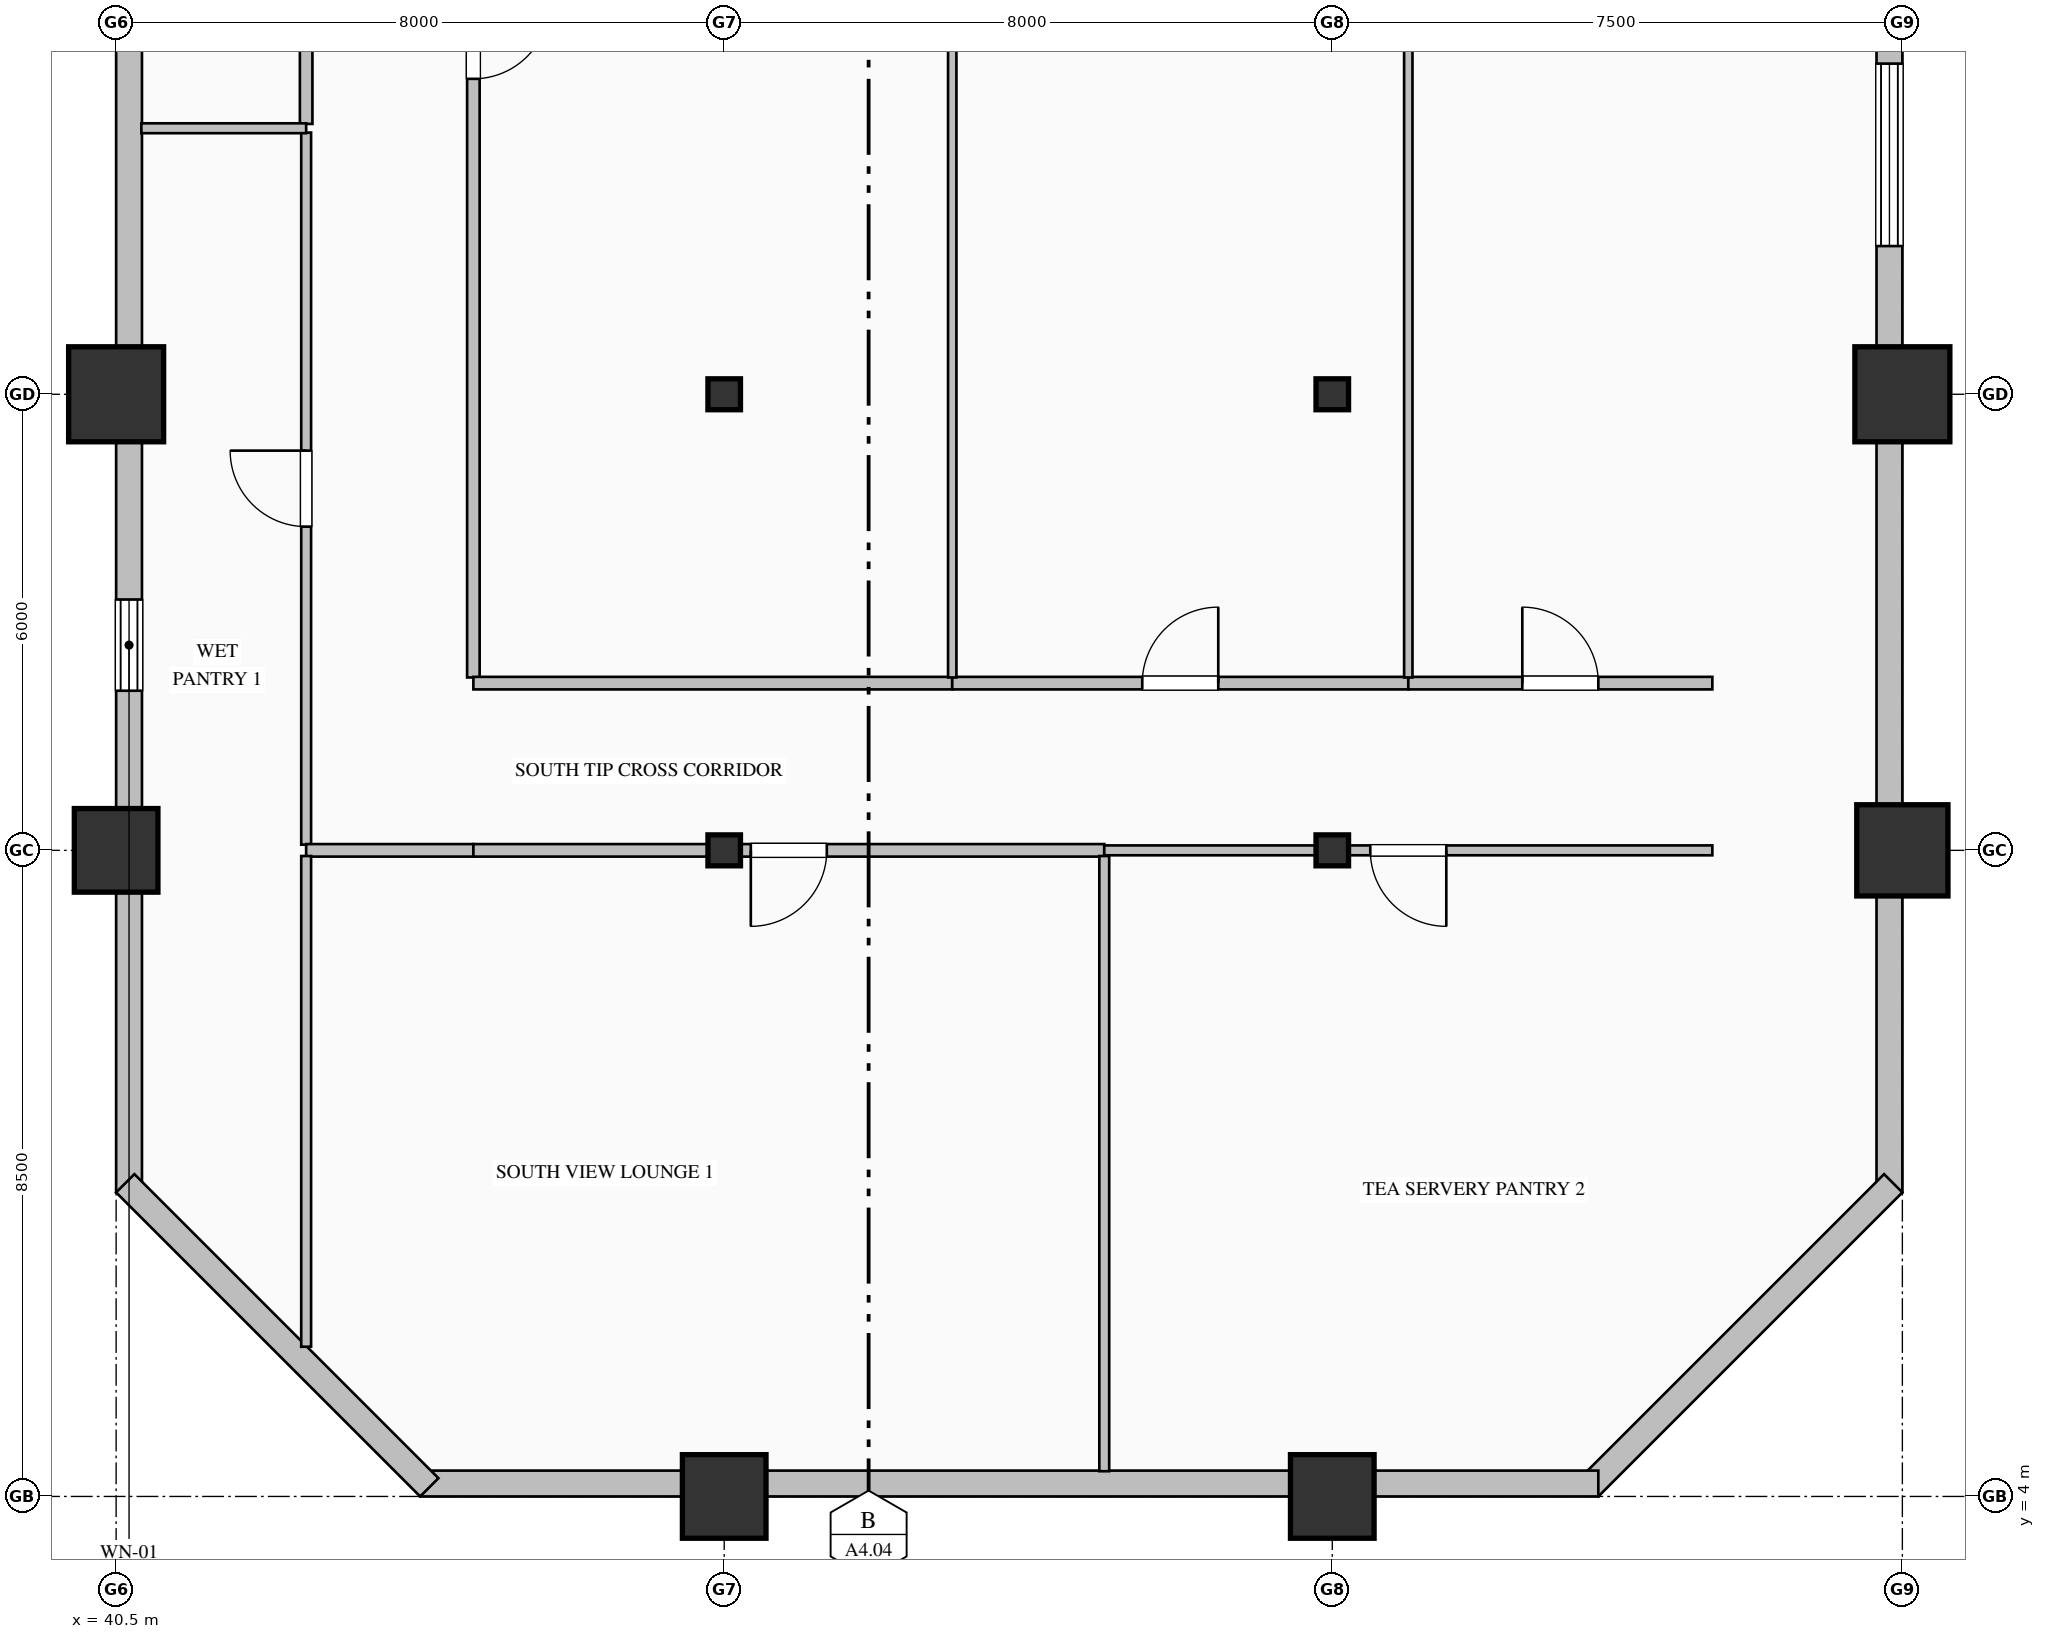
"""IFC4 building model, lengths in metres.
Left out: names, types, materials, properties, quantities, classifications, styles, units other than length and angle.
Written with IfcOpenShell. Run it as: python <this file> out.ifc"""

import sys

from ifc_helpers import new_model, si_unit, direction, frame, frame_2d, origin, origin_2d, place, context, subcontext, project, spatial, rectangle, hollow_rectangle, hollow_circle, i_section, extrude, element, fill, save


model = new_model("IFC4")
c1 = context("Model", 3, precision=1e-05, world=origin(), true_north=direction((0.0, 1.0)))
c2 = subcontext(c1, "Body", "Model", "MODEL_VIEW")
j1 = project(units=[si_unit("LENGTHUNIT", "METRE"), si_unit("PLANEANGLEUNIT", "RADIAN")], contexts=[c1])
p1 = place(None, origin())
s1 = spatial("IfcSite", under=j1, at=p1, CompositionType="ELEMENT")
p2 = place(p1, origin())
s2 = spatial("IfcBuilding", under=s1, at=p2, CompositionType="ELEMENT")
p3 = place(p2, frame((0.0, 0.0, 72.2)))
s3 = spatial("IfcBuildingStorey", under=s2, at=p3, CompositionType="ELEMENT", Elevation=72.2)
p4 = place(p3, frame((40.5, 12.5, 0.0), z_axis=(0.0, 0.0, 1.0), x_axis=(1.0, 0.0, 0.0)))
e1 = element("IfcColumn", 1, at=p4, inside=s3, PredefinedType="COLUMN", context=c2, shape_type="SweptSolid", body=[
    extrude(hollow_rectangle(XDim=1.1, YDim=1.1, WallThickness=0.04, at=origin_2d()), origin(), (0.0, 0.0, 1.0), 4.0),
])
p5 = place(p3, frame((40.5, 18.5, 0.0), z_axis=(0.0, 0.0, 1.0), x_axis=(1.0, 0.0, 0.0)))
e2 = element("IfcColumn", 2, at=p5, inside=s3, PredefinedType="COLUMN", context=c2, shape_type="SweptSolid", body=[
    extrude(hollow_rectangle(XDim=1.25, YDim=1.25, WallThickness=0.045, at=origin_2d()), origin(), (0.0, 0.0, 1.0), 4.0),
])
p6 = place(p3, frame((48.5, 4.0, 0.0), z_axis=(0.0, 0.0, 1.0), x_axis=(1.0, 0.0, 0.0)))
e3 = element("IfcColumn", 3, at=p6, inside=s3, PredefinedType="COLUMN", context=c2, shape_type="SweptSolid", body=[
    extrude(hollow_rectangle(XDim=1.1, YDim=1.1, WallThickness=0.04, at=origin_2d()), origin(), (0.0, 0.0, 1.0), 4.0),
])
for number, where, z_axis, x_axis in (
    (4, (48.5, 12.5, 0.0), (0.0, 0.0, 1.0), (1.0, 0.0, 0.0)),
    (5, (48.5, 18.5, 0.0), (0.0, 0.0, 1.0), (1.0, 0.0, 0.0)),
):
    element("IfcColumn", number, at=place(p3, frame(where, z_axis=z_axis, x_axis=x_axis)), inside=s3, PredefinedType="COLUMN", context=c2, shape_type="SweptSolid", body=[
        extrude(i_section(OverallWidth=0.407, OverallDepth=0.428, WebThickness=0.02, FlangeThickness=0.035, FilletRadius=0.022, at=origin_2d()), origin(), (0.0, 0.0, 1.0), 4.0),
    ])
p7 = place(p3, frame((56.5, 4.0, 0.0), z_axis=(0.0, 0.0, 1.0), x_axis=(1.0, 0.0, 0.0)))
e6 = element("IfcColumn", 6, at=p7, inside=s3, PredefinedType="COLUMN", context=c2, shape_type="SweptSolid", body=[
    extrude(hollow_rectangle(XDim=1.1, YDim=1.1, WallThickness=0.04, at=origin_2d()), origin(), (0.0, 0.0, 1.0), 4.0),
])
for number, where, z_axis, x_axis in (
    (7, (56.5, 12.5, 0.0), (0.0, 0.0, 1.0), (1.0, 0.0, 0.0)),
    (8, (56.5, 18.5, 0.0), (0.0, 0.0, 1.0), (1.0, 0.0, 0.0)),
):
    element("IfcColumn", number, at=place(p3, frame(where, z_axis=z_axis, x_axis=x_axis)), inside=s3, PredefinedType="COLUMN", context=c2, shape_type="SweptSolid", body=[
        extrude(i_section(OverallWidth=0.407, OverallDepth=0.428, WebThickness=0.02, FlangeThickness=0.035, FilletRadius=0.022, at=origin_2d()), origin(), (0.0, 0.0, 1.0), 4.0),
    ])
p8 = place(p3, frame((64.0, 12.5, 0.0), z_axis=(0.0, 0.0, 1.0), x_axis=(1.0, 0.0, 0.0)))
e9 = element("IfcColumn", 9, at=p8, inside=s3, PredefinedType="COLUMN", context=c2, shape_type="SweptSolid", body=[
    extrude(hollow_circle(Radius=0.6, WallThickness=0.04, at=origin_2d()), origin(), (0.0, 0.0, 1.0), 4.0),
])
p9 = place(p3, frame((64.0, 18.5, 0.0), z_axis=(0.0, 0.0, 1.0), x_axis=(1.0, 0.0, 0.0)))
e10 = element("IfcColumn", 10, at=p9, inside=s3, PredefinedType="COLUMN", context=c2, shape_type="SweptSolid", body=[
    extrude(hollow_rectangle(XDim=1.25, YDim=1.25, WallThickness=0.045, at=origin_2d()), origin(), (0.0, 0.0, 1.0), 4.0),
])
p10 = place(p3, frame((40.67, 8.0, 0.0), z_axis=(0.0, 0.0, 1.0), x_axis=(0.0, 1.0, 0.0)))
e11 = element("IfcWall", 11, at=p10, inside=s3, PredefinedType="SOLIDWALL", context=c2, shape_type="SweptSolid", body=[
    extrude(rectangle(XDim=20.34, YDim=0.34, at=frame_2d((10.17, 0.0))), origin(), (0.0, 0.0, 1.0), 3.05),
])
p11 = place(p10, frame((6.6, 0.0, 0.7)))
e12 = element("IfcOpeningElement", 12, at=p11, cuts=e11, PredefinedType="OPENING", context=c2, shape_type="SweptSolid", body=[
    extrude(rectangle(XDim=1.2, YDim=1.85, at=frame_2d((0.6, 0.925))), frame((0.0, 0.18, 0.0), z_axis=(0.0, -1.0, 0.0), x_axis=(1.0, 0.0, 0.0)), (0.0, 0.0, 1.0), 0.36),
])
p12 = place(p3, frame((63.83, 36.05, 0.0), z_axis=(0.0, 0.0, 1.0), x_axis=(0.0, -1.0, 0.0)))
e13 = element("IfcWall", 13, at=p12, inside=s3, PredefinedType="SOLIDWALL", context=c2, shape_type="SweptSolid", body=[
    extrude(rectangle(XDim=28.05, YDim=0.34, at=frame_2d((14.025, 0.0))), origin(), (0.0, 0.0, 1.0), 3.25),
])
p13 = place(p12, frame((2.4, 0.0, 0.8)))
e14 = element("IfcOpeningElement", 14, at=p13, cuts=e13, PredefinedType="OPENING", context=c2, shape_type="SweptSolid", body=[
    extrude(rectangle(XDim=2.4, YDim=2.15, at=frame_2d((1.2, 1.075))), frame((0.0, 0.18, 0.0), z_axis=(0.0, -1.0, 0.0), x_axis=(1.0, 0.0, 0.0)), (0.0, 0.0, 1.0), 0.36),
])
p14 = place(p12, frame((9.75, 0.0, 0.85)))
e15 = element("IfcOpeningElement", 15, at=p14, cuts=e13, PredefinedType="OPENING", context=c2, shape_type="SweptSolid", body=[
    extrude(rectangle(XDim=2.1, YDim=2.05, at=frame_2d((1.05, 1.025))), frame((0.0, 0.18, 0.0), z_axis=(0.0, -1.0, 0.0), x_axis=(1.0, 0.0, 0.0)), (0.0, 0.0, 1.0), 0.36),
])
p15 = place(p12, frame((13.2, 0.0, 0.8)))
e16 = element("IfcOpeningElement", 16, at=p15, cuts=e13, PredefinedType="OPENING", context=c2, shape_type="SweptSolid", body=[
    extrude(rectangle(XDim=2.4, YDim=2.15, at=frame_2d((1.2, 1.075))), frame((0.0, 0.18, 0.0), z_axis=(0.0, -1.0, 0.0), x_axis=(1.0, 0.0, 0.0)), (0.0, 0.0, 1.0), 0.36),
])
p16 = place(p3, frame((63.88, 8.12, 0.0), z_axis=(0.0, 0.0, 1.0), x_axis=(-0.707106781187, -0.707106781187, 0.0)))
e17 = element("IfcWall", 17, at=p16, inside=s3, PredefinedType="SOLIDWALL", context=c2, shape_type="SweptSolid", body=[
    extrude(rectangle(XDim=5.657, YDim=0.34, at=frame_2d((2.828, 0.0))), origin(), (0.0, 0.0, 1.0), 3.75),
])
p17 = place(p3, frame((60.0, 4.17, 0.0), z_axis=(0.0, 0.0, 1.0), x_axis=(-1.0, 0.0, 0.0)))
e18 = element("IfcWall", 18, at=p17, inside=s3, PredefinedType="SOLIDWALL", context=c2, shape_type="SweptSolid", body=[
    extrude(rectangle(XDim=15.5, YDim=0.34, at=frame_2d((7.75, 0.0))), origin(), (0.0, 0.0, 1.0), 3.25),
])
p18 = place(p3, frame((44.62, 4.12, 0.0), z_axis=(0.0, 0.0, 1.0), x_axis=(-0.707106781187, 0.707106781187, 0.0)))
e19 = element("IfcWall", 19, at=p18, inside=s3, PredefinedType="SOLIDWALL", context=c2, shape_type="SweptSolid", body=[
    extrude(rectangle(XDim=5.657, YDim=0.34, at=frame_2d((2.828, 0.0))), origin(), (0.0, 0.0, 1.0), 3.75),
])
p19 = place(p3, frame((45.2, 31.525, 0.0), z_axis=(0.0, 0.0, 1.0), x_axis=(0.0, -1.0, 0.0)))
e20 = element("IfcWall", 20, at=p19, inside=s3, PredefinedType="PARTITIONING", context=c2, shape_type="SweptSolid", body=[
    extrude(rectangle(XDim=16.751, YDim=0.165, at=frame_2d((8.375, 0.0))), origin(), (0.0, 0.0, 1.0), 3.75),
])
p20 = place(p19, frame((7.875, 0.0, 0.0)))
e21 = element("IfcOpeningElement", 21, at=p20, cuts=e20, PredefinedType="OPENING", context=c2, shape_type="SweptSolid", body=[
    extrude(rectangle(XDim=1.0, YDim=2.15, at=frame_2d((0.5, 1.075))), frame((0.0, 0.093, 0.0), z_axis=(0.0, -1.0, 0.0), x_axis=(1.0, 0.0, 0.0)), (0.0, 0.0, 1.0), 0.185),
])
p21 = place(p3, frame((43.0, 12.574, 0.0), z_axis=(0.0, 0.0, 1.0), x_axis=(0.0, 1.0, 0.0)))
e22 = element("IfcWall", 22, at=p21, inside=s3, PredefinedType="PARTITIONING", context=c2, shape_type="SweptSolid", body=[
    extrude(rectangle(XDim=9.369, YDim=0.13, at=frame_2d((4.684, 0.0))), origin(), (0.0, 0.0, 1.0), 3.75),
])
p22 = place(p21, frame((4.184, 0.0, 0.0)))
e23 = element("IfcOpeningElement", 23, at=p22, cuts=e22, PredefinedType="OPENING", context=c2, shape_type="SweptSolid", body=[
    extrude(rectangle(XDim=1.0, YDim=2.15, at=frame_2d((0.5, 1.075))), frame((0.0, 0.075, 0.0), z_axis=(0.0, -1.0, 0.0), x_axis=(1.0, 0.0, 0.0)), (0.0, 0.0, 1.0), 0.15),
])
p23 = place(p3, frame((43.0, 22.057, 0.0), z_axis=(0.0, 0.0, 1.0), x_axis=(0.0, 1.0, 0.0)))
e24 = element("IfcWall", 24, at=p23, inside=s3, PredefinedType="PARTITIONING", context=c2, shape_type="SweptSolid", body=[
    extrude(rectangle(XDim=9.469, YDim=0.165, at=frame_2d((4.734, 0.0))), origin(), (0.0, 0.0, 1.0), 3.75),
])
p24 = place(p23, frame((4.234, 0.0, 0.0)))
e25 = element("IfcOpeningElement", 25, at=p24, cuts=e24, PredefinedType="OPENING", context=c2, shape_type="SweptSolid", body=[
    extrude(rectangle(XDim=1.0, YDim=2.15, at=frame_2d((0.5, 1.075))), frame((0.0, 0.093, 0.0), z_axis=(0.0, -1.0, 0.0), x_axis=(1.0, 0.0, 0.0)), (0.0, 0.0, 1.0), 0.185),
])
p25 = place(p3, frame((45.2, 12.5, 0.0), z_axis=(0.0, 0.0, 1.0), x_axis=(-1.0, 0.0, 0.0)))
e26 = element("IfcWall", 26, at=p25, inside=s3, PredefinedType="PARTITIONING", context=c2, shape_type="SweptSolid", body=[
    extrude(rectangle(XDim=2.2, YDim=0.165, at=frame_2d((1.1, 0.0))), origin(), (0.0, 0.0, 1.0), 3.042),
])
p26 = place(p3, frame((45.2, 14.7, 0.0), z_axis=(0.0, 0.0, 1.0), x_axis=(1.0, 0.0, 0.0)))
e27 = element("IfcWall", 27, at=p26, inside=s3, PredefinedType="PARTITIONING", context=c2, shape_type="SweptSolid", body=[
    extrude(rectangle(XDim=6.3, YDim=0.165, at=frame_2d((3.15, 0.0))), origin(), (0.0, 0.0, 1.0), 3.75),
])
p27 = place(p3, frame((51.5, 14.7, 0.0), z_axis=(0.0, 0.0, 1.0), x_axis=(1.0, 0.0, 0.0)))
e28 = element("IfcWall", 28, at=p27, inside=s3, PredefinedType="PARTITIONING", context=c2, shape_type="SweptSolid", body=[
    extrude(rectangle(XDim=6.0, YDim=0.165, at=frame_2d((3.0, 0.0))), origin(), (0.0, 0.0, 1.0), 3.75),
])
p28 = place(p27, frame((2.5, 0.0, 0.0)))
e29 = element("IfcOpeningElement", 29, at=p28, cuts=e28, PredefinedType="OPENING", context=c2, shape_type="SweptSolid", body=[
    extrude(rectangle(XDim=1.0, YDim=2.15, at=frame_2d((0.5, 1.075))), frame((0.0, 0.093, 0.0), z_axis=(0.0, -1.0, 0.0), x_axis=(1.0, 0.0, 0.0)), (0.0, 0.0, 1.0), 0.185),
])
p29 = place(p3, frame((57.5, 14.7, 0.0), z_axis=(0.0, 0.0, 1.0), x_axis=(1.0, 0.0, 0.0)))
e30 = element("IfcWall", 30, at=p29, inside=s3, PredefinedType="PARTITIONING", context=c2, shape_type="SweptSolid", body=[
    extrude(rectangle(XDim=4.0, YDim=0.165, at=frame_2d((2.0, 0.0))), origin(), (0.0, 0.0, 1.0), 3.75),
])
p30 = place(p29, frame((1.5, 0.0, 0.0)))
e31 = element("IfcOpeningElement", 31, at=p30, cuts=e30, PredefinedType="OPENING", context=c2, shape_type="SweptSolid", body=[
    extrude(rectangle(XDim=1.0, YDim=2.15, at=frame_2d((0.5, 1.075))), frame((0.0, 0.093, 0.0), z_axis=(0.0, -1.0, 0.0), x_axis=(1.0, 0.0, 0.0)), (0.0, 0.0, 1.0), 0.185),
])
p31 = place(p3, frame((53.5, 12.5, 0.0), z_axis=(0.0, 0.0, 1.0), x_axis=(-1.0, 0.0, 0.0)))
e32 = element("IfcWall", 32, at=p31, inside=s3, PredefinedType="PARTITIONING", context=c2, shape_type="SweptSolid", body=[
    extrude(rectangle(XDim=8.3, YDim=0.165, at=frame_2d((4.15, 0.0))), origin(), (0.0, 0.0, 1.0), 3.042),
])
p32 = place(p31, frame((3.65, 0.0, 0.0)))
e33 = element("IfcOpeningElement", 33, at=p32, cuts=e32, PredefinedType="OPENING", context=c2, shape_type="SweptSolid", body=[
    extrude(rectangle(XDim=1.0, YDim=2.15, at=frame_2d((0.5, 1.075))), frame((0.0, 0.093, 0.0), z_axis=(0.0, -1.0, 0.0), x_axis=(1.0, 0.0, 0.0)), (0.0, 0.0, 1.0), 0.185),
])
p33 = place(p3, frame((61.5, 12.5, 0.0), z_axis=(0.0, 0.0, 1.0), x_axis=(-1.0, 0.0, 0.0)))
e34 = element("IfcWall", 34, at=p33, inside=s3, PredefinedType="PARTITIONING", context=c2, shape_type="SweptSolid", body=[
    extrude(rectangle(XDim=8.0, YDim=0.13, at=frame_2d((4.0, 0.0))), origin(), (0.0, 0.0, 1.0), 3.042),
])
p34 = place(p33, frame((3.5, 0.0, 0.0)))
e35 = element("IfcOpeningElement", 35, at=p34, cuts=e34, PredefinedType="OPENING", context=c2, shape_type="SweptSolid", body=[
    extrude(rectangle(XDim=1.0, YDim=2.15, at=frame_2d((0.5, 1.075))), frame((0.0, 0.075, 0.0), z_axis=(0.0, -1.0, 0.0), x_axis=(1.0, 0.0, 0.0)), (0.0, 0.0, 1.0), 0.15),
])
p35 = place(p3, frame((51.5, 31.525, 0.0), z_axis=(0.0, 0.0, 1.0), x_axis=(0.0, -1.0, 0.0)))
e36 = element("IfcWall", 36, at=p35, inside=s3, PredefinedType="MOVABLE", context=c2, shape_type="SweptSolid", body=[
    extrude(rectangle(XDim=16.751, YDim=0.11, at=frame_2d((8.375, 0.0))), origin(), (0.0, 0.0, 1.0), 3.75),
])
p36 = place(p3, frame((57.5, 36.0, 0.0), z_axis=(0.0, 0.0, 1.0), x_axis=(0.0, -1.0, 0.0)))
e37 = element("IfcWall", 37, at=p36, inside=s3, PredefinedType="MOVABLE", context=c2, shape_type="SweptSolid", body=[
    extrude(rectangle(XDim=21.226, YDim=0.11, at=frame_2d((10.613, 0.0))), origin(), (0.0, 0.0, 1.0), 3.75),
])
p37 = place(p3, frame((40.832, 22.0, 0.0), z_axis=(0.0, 0.0, 1.0), x_axis=(1.0, 0.0, 0.0)))
e38 = element("IfcWall", 38, at=p37, inside=s3, PredefinedType="PARTITIONING", context=c2, shape_type="SweptSolid", body=[
    extrude(rectangle(XDim=2.168, YDim=0.13, at=frame_2d((1.084, 0.0))), origin(), (0.0, 0.0, 1.0), 3.75),
])
p38 = place(p3, frame((43.0, 12.426, 0.0), z_axis=(0.0, 0.0, 1.0), x_axis=(0.0, -1.0, 0.0)))
e39 = element("IfcWall", 39, at=p38, inside=s3, PredefinedType="PARTITIONING", context=c2, shape_type="SweptSolid", body=[
    extrude(rectangle(XDim=6.456, YDim=0.13, at=frame_2d((3.228, 0.0))), origin(), (0.0, 0.0, 1.0), 3.75),
])
p39 = place(p3, frame((53.5, 12.426, 0.0), z_axis=(0.0, 0.0, 1.0), x_axis=(0.0, -1.0, 0.0)))
e40 = element("IfcWall", 40, at=p39, inside=s3, PredefinedType="PARTITIONING", context=c2, shape_type="SweptSolid", body=[
    extrude(rectangle(XDim=8.094, YDim=0.13, at=frame_2d((4.047, 0.0))), origin(), (0.0, 0.0, 1.0), 3.75),
])
p40 = place(p11, origin())
e41 = element("IfcWindow", 41, at=p40, inside=s3, PartitioningType="DOUBLE_PANEL_VERTICAL", PredefinedType="WINDOW", context=c2, shape_type="SweptSolid", body=[
    extrude(rectangle(XDim=1.2, YDim=1.85, at=frame_2d((0.6, 0.925))), frame((0.0, 0.15, 0.0), z_axis=(0.0, -1.0, 0.0), x_axis=(1.0, 0.0, 0.0)), (0.0, 0.0, 1.0), 0.06),
])
fill(e12, e41)
p41 = place(p15, origin())
e42 = element("IfcWindow", 42, at=p41, inside=s3, PartitioningType="TRIPLE_PANEL_VERTICAL", PredefinedType="WINDOW", context=c2, shape_type="SweptSolid", body=[
    extrude(rectangle(XDim=2.4, YDim=2.15, at=frame_2d((1.2, 1.075))), frame((0.0, 0.15, 0.0), z_axis=(0.0, -1.0, 0.0), x_axis=(1.0, 0.0, 0.0)), (0.0, 0.0, 1.0), 0.06),
])
fill(e16, e42)
p42 = place(p20, origin())
e43 = element("IfcDoor", 43, at=p42, inside=s3, OperationType="SINGLE_SWING_LEFT", PredefinedType="DOOR", context=c2, shape_type="SweptSolid", body=[
    extrude(rectangle(XDim=1.0, YDim=2.15, at=frame_2d((0.5, 1.075))), frame((0.0, 0.025, 0.0), z_axis=(0.0, -1.0, 0.0), x_axis=(1.0, 0.0, 0.0)), (0.0, 0.0, 1.0), 0.05),
])
fill(e21, e43)
p43 = place(p28, origin())
e44 = element("IfcDoor", 44, at=p43, inside=s3, OperationType="SINGLE_SWING_RIGHT", PredefinedType="DOOR", context=c2, shape_type="SweptSolid", body=[
    extrude(rectangle(XDim=1.0, YDim=2.15, at=frame_2d((0.5, 1.075))), frame((0.0, 0.025, 0.0), z_axis=(0.0, -1.0, 0.0), x_axis=(1.0, 0.0, 0.0)), (0.0, 0.0, 1.0), 0.05),
])
fill(e29, e44)
p44 = place(p30, origin())
e45 = element("IfcDoor", 45, at=p44, inside=s3, OperationType="SINGLE_SWING_LEFT", PredefinedType="DOOR", context=c2, shape_type="SweptSolid", body=[
    extrude(rectangle(XDim=1.0, YDim=2.15, at=frame_2d((0.5, 1.075))), frame((0.0, 0.025, 0.0), z_axis=(0.0, -1.0, 0.0), x_axis=(1.0, 0.0, 0.0)), (0.0, 0.0, 1.0), 0.05),
])
fill(e31, e45)
p45 = place(p22, origin())
e46 = element("IfcDoor", 46, at=p45, inside=s3, OperationType="SINGLE_SWING_RIGHT", PredefinedType="DOOR", context=c2, shape_type="SweptSolid", body=[
    extrude(rectangle(XDim=1.0, YDim=2.15, at=frame_2d((0.5, 1.075))), frame((0.0, 0.025, 0.0), z_axis=(0.0, -1.0, 0.0), x_axis=(1.0, 0.0, 0.0)), (0.0, 0.0, 1.0), 0.05),
])
fill(e23, e46)
p46 = place(p32, origin())
e47 = element("IfcDoor", 47, at=p46, inside=s3, OperationType="SINGLE_SWING_RIGHT", PredefinedType="DOOR", context=c2, shape_type="SweptSolid", body=[
    extrude(rectangle(XDim=1.0, YDim=2.15, at=frame_2d((0.5, 1.075))), frame((0.0, 0.025, 0.0), z_axis=(0.0, -1.0, 0.0), x_axis=(1.0, 0.0, 0.0)), (0.0, 0.0, 1.0), 0.05),
])
fill(e33, e47)
p47 = place(p34, origin())
e48 = element("IfcDoor", 48, at=p47, inside=s3, OperationType="SINGLE_SWING_LEFT", PredefinedType="DOOR", context=c2, shape_type="SweptSolid", body=[
    extrude(rectangle(XDim=1.0, YDim=2.15, at=frame_2d((0.5, 1.075))), frame((0.0, 0.025, 0.0), z_axis=(0.0, -1.0, 0.0), x_axis=(1.0, 0.0, 0.0)), (0.0, 0.0, 1.0), 0.05),
])
fill(e35, e48)
save(model, sys.argv[1])
